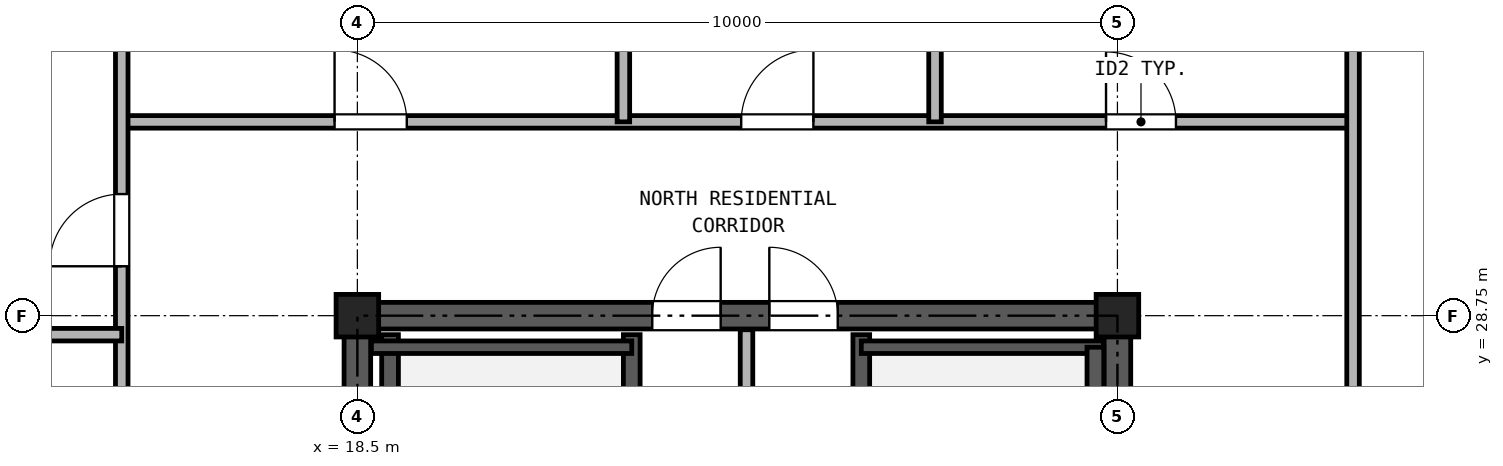
"""IFC4 building model, lengths in metres.
Left out: names, types, materials, properties, quantities, classifications, styles, units other than length and angle.
Written with IfcOpenShell. Run it as: python <this file> out.ifc"""

import sys

from ifc_helpers import new_model, si_unit, direction, frame, frame_2d, origin, origin_2d, place, context, subcontext, project, spatial, rectangle, hollow_rectangle, extrude, source, transform, mapped, element, fill, save


model = new_model("IFC4")
c1 = context("Model", 3, precision=1e-05, world=origin(), true_north=direction((0.0, 1.0)))
c2 = subcontext(c1, "Body", "Model", "MODEL_VIEW")
j1 = project(units=[si_unit("LENGTHUNIT", "METRE"), si_unit("PLANEANGLEUNIT", "RADIAN")], contexts=[c1])
p1 = place(None, origin())
s1 = spatial("IfcSite", under=j1, at=p1, CompositionType="ELEMENT")
p2 = place(p1, origin())
s2 = spatial("IfcBuilding", under=s1, at=p2, CompositionType="ELEMENT")
p3 = place(p2, frame((0.0, 0.0, 239.3)))
s3 = spatial("IfcBuildingStorey", under=s2, at=p3, CompositionType="ELEMENT", Elevation=239.3)
m1 = source(origin(), c2, "Body", "SweptSolid", [
    extrude(hollow_rectangle(XDim=0.56, YDim=0.56, WallThickness=0.03, at=origin_2d()), origin(), (0.0, 0.0, 1.0), 2.98),
])
for number, where, z_axis, x_axis in (
    (1, (18.5, 28.75, 0.0), (0.0, 0.0, 1.0), (1.0, 0.0, 0.0)),
    (2, (28.5, 28.75, 0.0), (0.0, 0.0, 1.0), (1.0, 0.0, 0.0)),
):
    element("IfcColumn", number, at=place(p3, frame(where, z_axis=z_axis, x_axis=x_axis)), inside=s3, PredefinedType="COLUMN", context=c2, shape_type="MappedRepresentation", body=[
        mapped(m1, transform((0.0, 0.0, 0.0), x_axis=(1.0, 0.0, 0.0), y_axis=(0.0, 1.0, 0.0), z_axis=(0.0, 0.0, 1.0), scale=1.0)),
    ])
p4 = place(p3, frame((18.325, 28.75, 0.0), z_axis=(0.0, 0.0, 1.0), x_axis=(1.0, 0.0, 0.0)))
e3 = element("IfcWall", 3, at=p4, inside=s3, PredefinedType="SHEAR", context=c2, shape_type="SweptSolid", body=[
    extrude(rectangle(XDim=10.35, YDim=0.35, at=frame_2d((5.175, 0.0))), origin(), (0.0, 0.0, 1.0), 2.98),
])
p5 = place(p4, frame((4.055, 0.0, 0.0)))
e4 = element("IfcOpeningElement", 4, at=p5, cuts=e3, PredefinedType="OPENING", context=c2, shape_type="SweptSolid", body=[
    extrude(rectangle(XDim=0.9, YDim=2.05, at=frame_2d((0.45, 1.025))), frame((0.0, 0.185, 0.0), z_axis=(0.0, -1.0, 0.0), x_axis=(1.0, 0.0, 0.0)), (0.0, 0.0, 1.0), 0.37),
])
p6 = place(p4, frame((5.595, 0.0, 0.0)))
e5 = element("IfcOpeningElement", 5, at=p6, cuts=e3, PredefinedType="OPENING", context=c2, shape_type="SweptSolid", body=[
    extrude(rectangle(XDim=0.9, YDim=2.05, at=frame_2d((0.45, 1.025))), frame((0.0, 0.185, 0.0), z_axis=(0.0, -1.0, 0.0), x_axis=(1.0, 0.0, 0.0)), (0.0, 0.0, 1.0), 0.37),
])
p7 = place(p3, frame((18.5, 11.675, 0.0), z_axis=(0.0, 0.0, 1.0), x_axis=(0.0, 1.0, 0.0)))
e6 = element("IfcWall", 6, at=p7, inside=s3, PredefinedType="SHEAR", context=c2, shape_type="SweptSolid", body=[
    extrude(rectangle(XDim=16.9, YDim=0.35, at=frame_2d((8.45, 0.0))), origin(), (0.0, 0.0, 1.0), 2.98),
])
p8 = place(p7, frame((7.475, 0.0, 0.0)))
e7 = element("IfcOpeningElement", 7, at=p8, cuts=e6, PredefinedType="OPENING", context=c2, shape_type="SweptSolid", body=[
    extrude(rectangle(XDim=1.15, YDim=2.2, at=frame_2d((0.575, 1.1))), frame((0.0, 0.185, 0.0), z_axis=(0.0, -1.0, 0.0), x_axis=(1.0, 0.0, 0.0)), (0.0, 0.0, 1.0), 0.37),
])
p9 = place(p3, frame((28.5, 11.675, 0.0), z_axis=(0.0, 0.0, 1.0), x_axis=(0.0, 1.0, 0.0)))
e8 = element("IfcWall", 8, at=p9, inside=s3, PredefinedType="SHEAR", context=c2, shape_type="SweptSolid", body=[
    extrude(rectangle(XDim=16.9, YDim=0.35, at=frame_2d((8.45, 0.0))), origin(), (0.0, 0.0, 1.0), 2.98),
])
p10 = place(p9, frame((7.475, 0.0, 0.0)))
e9 = element("IfcOpeningElement", 9, at=p10, cuts=e8, PredefinedType="OPENING", context=c2, shape_type="SweptSolid", body=[
    extrude(rectangle(XDim=1.15, YDim=2.2, at=frame_2d((0.575, 1.1))), frame((0.0, 0.185, 0.0), z_axis=(0.0, -1.0, 0.0), x_axis=(1.0, 0.0, 0.0)), (0.0, 0.0, 1.0), 0.37),
])
for number, where, z_axis, x_axis in (
    (10, (18.93, 21.39, 0.0), (0.0, 0.0, 1.0), (0.0, 1.0, 0.0)),
    (11, (22.11, 21.39, 0.0), (0.0, 0.0, 1.0), (0.0, 1.0, 0.0)),
    (12, (25.13, 21.39, 0.0), (0.0, 0.0, 1.0), (0.0, 1.0, 0.0)),
):
    element("IfcWall", number, at=place(p3, frame(where, z_axis=z_axis, x_axis=x_axis)), inside=s3, PredefinedType="SOLIDWALL", context=c2, shape_type="SweptSolid", body=[
        extrude(rectangle(XDim=7.11, YDim=0.22, at=frame_2d((3.555, 0.0))), origin(), (0.0, 0.0, 1.0), 2.98),
    ])
p11 = place(p3, frame((18.685, 28.335, 0.0), z_axis=(0.0, 0.0, 1.0), x_axis=(1.0, 0.0, 0.0)))
e13 = element("IfcWall", 13, at=p11, inside=s3, PredefinedType="PARTITIONING", context=c2, shape_type="SweptSolid", body=[
    extrude(rectangle(XDim=3.425, YDim=0.165, at=frame_2d((1.712, 0.0))), origin(), (0.0, 0.0, 1.0), 2.98),
])
p12 = place(p3, frame((25.13, 28.335, 0.0), z_axis=(0.0, 0.0, 1.0), x_axis=(1.0, 0.0, 0.0)))
e14 = element("IfcWall", 14, at=p12, inside=s3, PredefinedType="PARTITIONING", context=c2, shape_type="SweptSolid", body=[
    extrude(rectangle(XDim=3.185, YDim=0.165, at=frame_2d((1.593, 0.0))), origin(), (0.0, 0.0, 1.0), 2.98),
])
p13 = place(p3, frame((28.21, 21.39, 0.0), z_axis=(0.0, 0.0, 1.0), x_axis=(0.0, 1.0, 0.0)))
e15 = element("IfcWall", 15, at=p13, inside=s3, PredefinedType="SOLIDWALL", context=c2, shape_type="SweptSolid", body=[
    extrude(rectangle(XDim=6.945, YDim=0.22, at=frame_2d((3.473, 0.0))), origin(), (0.0, 0.0, 1.0), 2.98),
])
p14 = place(p3, frame((23.62, 24.4, 0.0), z_axis=(0.0, 0.0, 1.0), x_axis=(0.0, 1.0, 0.0)))
e16 = element("IfcWall", 16, at=p14, inside=s3, PredefinedType="PARTITIONING", context=c2, shape_type="SweptSolid", body=[
    extrude(rectangle(XDim=4.165, YDim=0.165, at=frame_2d((2.083, 0.0))), origin(), (0.0, 0.0, 1.0), 2.98),
])
p15 = place(p3, frame((15.4, 31.3, 0.0), z_axis=(0.0, 0.0, 1.0), x_axis=(1.0, 0.0, 0.0)))
e17 = element("IfcWall", 17, at=p15, inside=s3, PredefinedType="PARTITIONING", context=c2, shape_type="SweptSolid", body=[
    extrude(rectangle(XDim=16.2, YDim=0.165, at=frame_2d((8.1, 0.0))), origin(), (0.0, 0.0, 1.0), 2.98),
])
p16 = place(p15, frame((2.8, 0.0, 0.0)))
e18 = element("IfcOpeningElement", 18, at=p16, cuts=e17, PredefinedType="OPENING", context=c2, shape_type="SweptSolid", body=[
    extrude(rectangle(XDim=0.95, YDim=2.15, at=frame_2d((0.475, 1.075))), frame((0.0, 0.093, 0.0), z_axis=(0.0, -1.0, 0.0), x_axis=(1.0, 0.0, 0.0)), (0.0, 0.0, 1.0), 0.185),
])
p17 = place(p15, frame((8.15, 0.0, 0.0)))
e19 = element("IfcOpeningElement", 19, at=p17, cuts=e17, PredefinedType="OPENING", context=c2, shape_type="SweptSolid", body=[
    extrude(rectangle(XDim=0.95, YDim=2.15, at=frame_2d((0.475, 1.075))), frame((0.0, 0.093, 0.0), z_axis=(0.0, -1.0, 0.0), x_axis=(1.0, 0.0, 0.0)), (0.0, 0.0, 1.0), 0.185),
])
p18 = place(p15, frame((12.95, 0.0, 0.0)))
e20 = element("IfcOpeningElement", 20, at=p18, cuts=e17, PredefinedType="OPENING", context=c2, shape_type="SweptSolid", body=[
    extrude(rectangle(XDim=0.92, YDim=2.1, at=frame_2d((0.46, 1.05))), frame((0.0, 0.093, 0.0), z_axis=(0.0, -1.0, 0.0), x_axis=(1.0, 0.0, 0.0)), (0.0, 0.0, 1.0), 0.185),
])
p19 = place(p3, frame((15.4, 10.7, 0.0), z_axis=(0.0, 0.0, 1.0), x_axis=(0.0, 1.0, 0.0)))
e21 = element("IfcWall", 21, at=p19, inside=s3, PredefinedType="PARTITIONING", context=c2, shape_type="SweptSolid", body=[
    extrude(rectangle(XDim=24.44, YDim=0.165, at=frame_2d((12.22, 0.0))), origin(), (0.0, 0.0, 1.0), 2.98),
])
p20 = place(p19, frame((4.9, 0.0, 0.0)))
e22 = element("IfcOpeningElement", 22, at=p20, cuts=e21, PredefinedType="OPENING", context=c2, shape_type="SweptSolid", body=[
    extrude(rectangle(XDim=0.95, YDim=2.15, at=frame_2d((0.475, 1.075))), frame((0.0, 0.093, 0.0), z_axis=(0.0, -1.0, 0.0), x_axis=(1.0, 0.0, 0.0)), (0.0, 0.0, 1.0), 0.185),
])
p21 = place(p19, frame((13.8, 0.0, 0.0)))
e23 = element("IfcOpeningElement", 23, at=p21, cuts=e21, PredefinedType="OPENING", context=c2, shape_type="SweptSolid", body=[
    extrude(rectangle(XDim=0.95, YDim=2.15, at=frame_2d((0.475, 1.075))), frame((0.0, 0.093, 0.0), z_axis=(0.0, -1.0, 0.0), x_axis=(1.0, 0.0, 0.0)), (0.0, 0.0, 1.0), 0.185),
])
p22 = place(p19, frame((18.7, 0.0, 0.0)))
e24 = element("IfcOpeningElement", 24, at=p22, cuts=e21, PredefinedType="OPENING", context=c2, shape_type="SweptSolid", body=[
    extrude(rectangle(XDim=0.95, YDim=2.15, at=frame_2d((0.475, 1.075))), frame((0.0, 0.093, 0.0), z_axis=(0.0, -1.0, 0.0), x_axis=(1.0, 0.0, 0.0)), (0.0, 0.0, 1.0), 0.185),
])
p23 = place(p3, frame((31.6, 10.7, 0.0), z_axis=(0.0, 0.0, 1.0), x_axis=(0.0, 1.0, 0.0)))
e25 = element("IfcWall", 25, at=p23, inside=s3, PredefinedType="PARTITIONING", context=c2, shape_type="SweptSolid", body=[
    extrude(rectangle(XDim=24.44, YDim=0.165, at=frame_2d((12.22, 0.0))), origin(), (0.0, 0.0, 1.0), 2.98),
])
p24 = place(p23, frame((5.4, 0.0, 0.0)))
e26 = element("IfcOpeningElement", 26, at=p24, cuts=e25, PredefinedType="OPENING", context=c2, shape_type="SweptSolid", body=[
    extrude(rectangle(XDim=1.0, YDim=2.15, at=frame_2d((0.5, 1.075))), frame((0.0, 0.093, 0.0), z_axis=(0.0, -1.0, 0.0), x_axis=(1.0, 0.0, 0.0)), (0.0, 0.0, 1.0), 0.185),
])
p25 = place(p23, frame((15.7, 0.0, 0.0)))
e27 = element("IfcOpeningElement", 27, at=p25, cuts=e25, PredefinedType="OPENING", context=c2, shape_type="SweptSolid", body=[
    extrude(rectangle(XDim=1.0, YDim=2.15, at=frame_2d((0.5, 1.075))), frame((0.0, 0.093, 0.0), z_axis=(0.0, -1.0, 0.0), x_axis=(1.0, 0.0, 0.0)), (0.0, 0.0, 1.0), 0.185),
])
p26 = place(p3, frame((5.36, 28.5, 0.0), z_axis=(0.0, 0.0, 1.0), x_axis=(1.0, 0.0, 0.0)))
e28 = element("IfcWall", 28, at=p26, inside=s3, PredefinedType="PARTITIONING", context=c2, shape_type="SweptSolid", body=[
    extrude(rectangle(XDim=10.04, YDim=0.165, at=frame_2d((5.02, 0.0))), origin(), (0.0, 0.0, 1.0), 2.428),
])
for number, where, z_axis, x_axis in (
    (29, (22.0, 31.3, 0.0), (0.0, 0.0, 1.0), (0.0, 1.0, 0.0)),
    (30, (26.1, 31.3, 0.0), (0.0, 0.0, 1.0), (0.0, 1.0, 0.0)),
):
    element("IfcWall", number, at=place(p3, frame(where, z_axis=z_axis, x_axis=x_axis)), inside=s3, PredefinedType="PARTITIONING", context=c2, shape_type="SweptSolid", body=[
        extrude(rectangle(XDim=3.84, YDim=0.165, at=frame_2d((1.92, 0.0))), origin(), (0.0, 0.0, 1.0), 2.98),
    ])
p27 = place(p5, origin())
e31 = element("IfcDoor", 31, at=p27, inside=s3, OperationType="SINGLE_SWING_RIGHT", PredefinedType="DOOR", context=c2, shape_type="SweptSolid", body=[
    extrude(rectangle(XDim=0.9, YDim=2.05, at=frame_2d((0.45, 1.025))), frame((0.0, 0.025, 0.0), z_axis=(0.0, -1.0, 0.0), x_axis=(1.0, 0.0, 0.0)), (0.0, 0.0, 1.0), 0.05),
])
fill(e4, e31)
p28 = place(p6, origin())
e32 = element("IfcDoor", 32, at=p28, inside=s3, OperationType="SINGLE_SWING_LEFT", PredefinedType="DOOR", context=c2, shape_type="SweptSolid", body=[
    extrude(rectangle(XDim=0.9, YDim=2.05, at=frame_2d((0.45, 1.025))), frame((0.0, 0.025, 0.0), z_axis=(0.0, -1.0, 0.0), x_axis=(1.0, 0.0, 0.0)), (0.0, 0.0, 1.0), 0.05),
])
fill(e5, e32)
p29 = place(p22, frame((0.95, 0.0, 0.0), z_axis=(0.0, 0.0, 1.0), x_axis=(-1.0, 0.0, 0.0)))
e33 = element("IfcDoor", 33, at=p29, inside=s3, OperationType="SINGLE_SWING_LEFT", PredefinedType="DOOR", context=c2, shape_type="SweptSolid", body=[
    extrude(rectangle(XDim=0.95, YDim=2.15, at=frame_2d((0.475, 1.075))), frame((0.0, 0.025, 0.0), z_axis=(0.0, -1.0, 0.0), x_axis=(1.0, 0.0, 0.0)), (0.0, 0.0, 1.0), 0.05),
])
fill(e24, e33)
p30 = place(p16, origin())
e34 = element("IfcDoor", 34, at=p30, inside=s3, OperationType="SINGLE_SWING_LEFT", PredefinedType="DOOR", context=c2, shape_type="SweptSolid", body=[
    extrude(rectangle(XDim=0.95, YDim=2.15, at=frame_2d((0.475, 1.075))), frame((0.0, 0.025, 0.0), z_axis=(0.0, -1.0, 0.0), x_axis=(1.0, 0.0, 0.0)), (0.0, 0.0, 1.0), 0.05),
])
fill(e18, e34)
p31 = place(p17, origin())
e35 = element("IfcDoor", 35, at=p31, inside=s3, OperationType="SINGLE_SWING_RIGHT", PredefinedType="DOOR", context=c2, shape_type="SweptSolid", body=[
    extrude(rectangle(XDim=0.95, YDim=2.15, at=frame_2d((0.475, 1.075))), frame((0.0, 0.025, 0.0), z_axis=(0.0, -1.0, 0.0), x_axis=(1.0, 0.0, 0.0)), (0.0, 0.0, 1.0), 0.05),
])
fill(e19, e35)
p32 = place(p18, origin())
e36 = element("IfcDoor", 36, at=p32, inside=s3, OperationType="SINGLE_SWING_LEFT", PredefinedType="DOOR", context=c2, shape_type="SweptSolid", body=[
    extrude(rectangle(XDim=0.92, YDim=2.1, at=frame_2d((0.46, 1.05))), frame((0.0, 0.025, 0.0), z_axis=(0.0, -1.0, 0.0), x_axis=(1.0, 0.0, 0.0)), (0.0, 0.0, 1.0), 0.05),
])
fill(e20, e36)
save(model, sys.argv[1])
